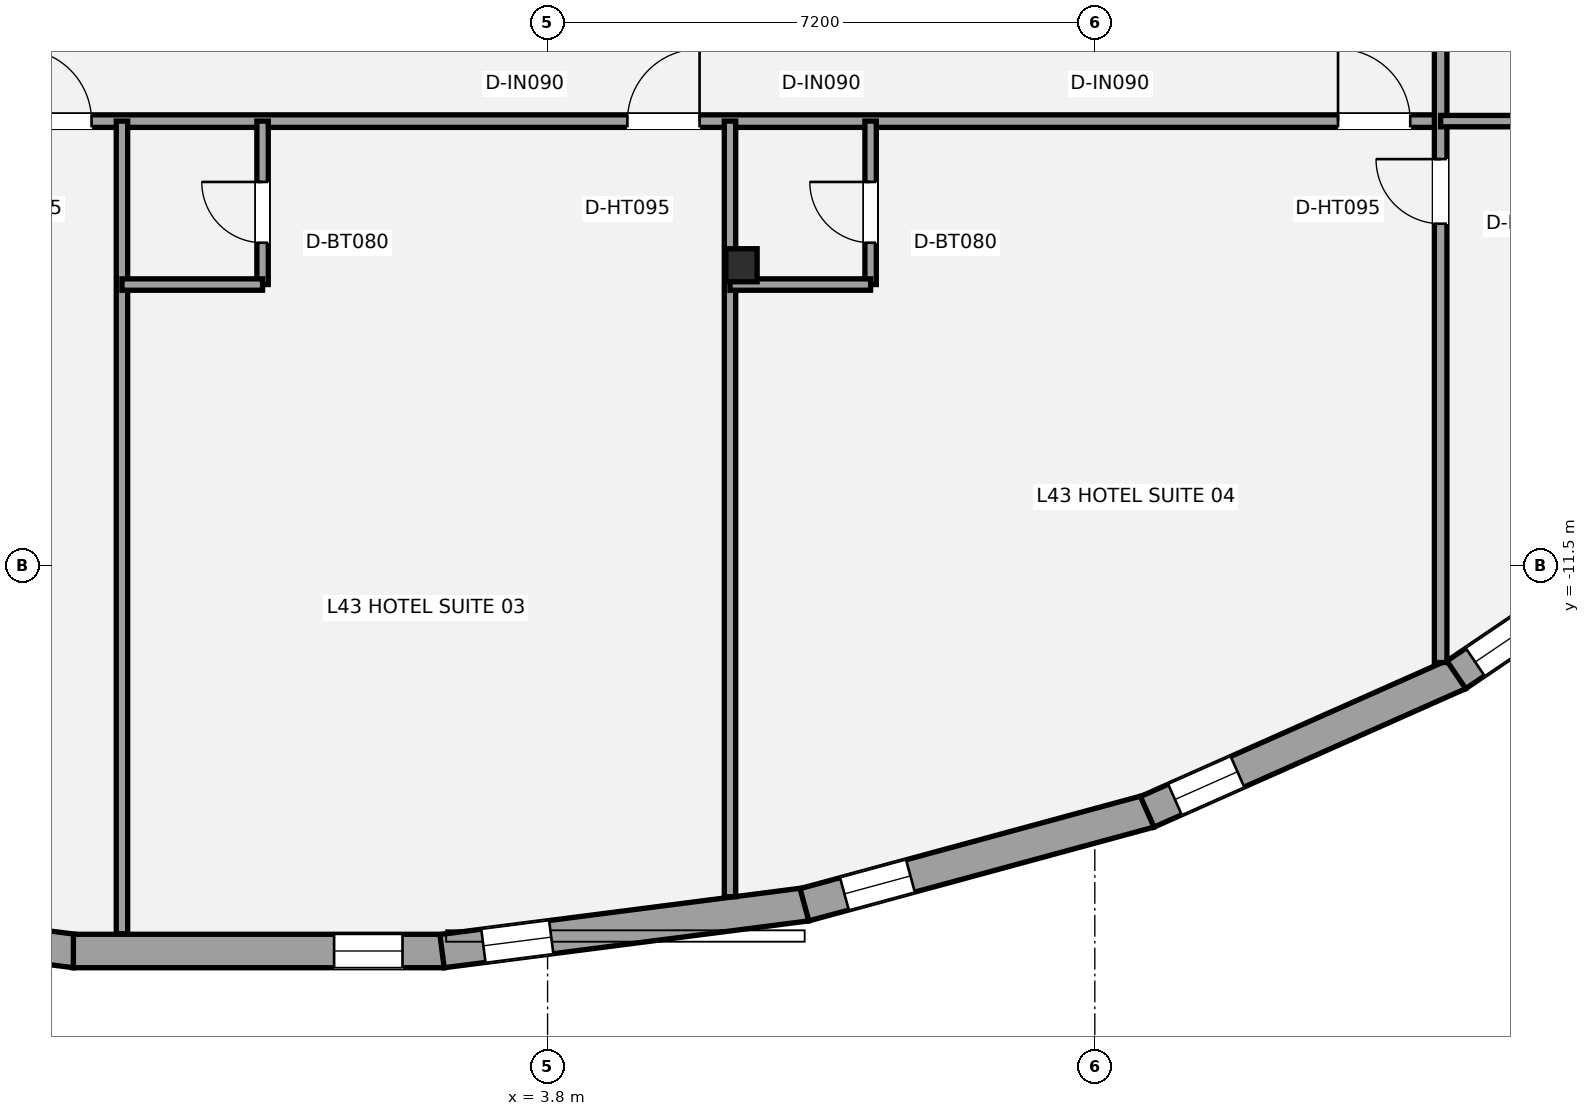
"""IFC4 building model, lengths in metres.
Left out: names, types, materials, properties, quantities, classifications, styles, units other than length and angle.
Written with IfcOpenShell. Run it as: python <this file> out.ifc"""

import sys

from ifc_helpers import new_model, si_unit, direction, frame, frame_2d, origin, origin_2d, place, context, subcontext, project, spatial, rectangle, i_section, extrude, element, fill, save


model = new_model("IFC4")
c1 = context("Model", 3, precision=1e-05, world=origin(), true_north=direction((0.0, 1.0)))
c2 = subcontext(c1, "Body", "Model", "MODEL_VIEW")
j1 = project(units=[si_unit("LENGTHUNIT", "METRE"), si_unit("PLANEANGLEUNIT", "RADIAN")], contexts=[c1])
p1 = place(None, origin())
s1 = spatial("IfcSite", under=j1, at=p1, CompositionType="ELEMENT")
p2 = place(p1, origin())
s2 = spatial("IfcBuilding", under=s1, at=p2, CompositionType="ELEMENT")
p3 = place(p2, frame((0.0, 0.0, 159.8)))
s3 = spatial("IfcBuildingStorey", under=s2, at=p3, CompositionType="ELEMENT", Elevation=159.8)
p4 = place(p3, frame((6.351, -7.546, 0.0), z_axis=(0.0, 0.0, 1.0), x_axis=(1.0, 0.0, 0.0)))
e1 = element("IfcColumn", 1, at=p4, inside=s3, PredefinedType="COLUMN", context=c2, shape_type="SweptSolid", body=[
    extrude(i_section(OverallWidth=0.412, OverallDepth=0.435, WebThickness=0.036, FlangeThickness=0.057, at=origin_2d()), origin(), (0.0, 0.0, 1.0), 3.2),
])
p5 = place(p3, frame((-2.411, -16.57, 0.0), z_axis=(0.0, 0.0, 1.0), x_axis=(-0.991852910824, 0.127388395426, 0.0)))
e2 = element("IfcWall", 2, at=p5, inside=s3, PredefinedType="STANDARD", context=c2, shape_type="SweptSolid", body=[
    extrude(rectangle(XDim=4.837, YDim=0.44, at=frame_2d((2.418, 0.0))), origin(), (0.0, 0.0, 1.0), 2.315),
])
p6 = place(p5, frame((0.598, 0.0, 0.58)))
e3 = element("IfcOpeningElement", 3, at=p6, cuts=e2, PredefinedType="OPENING", context=c2, shape_type="SweptSolid", body=[
    extrude(rectangle(XDim=0.9, YDim=1.35, at=frame_2d((0.45, 0.675))), frame((0.0, 0.23, 0.0), z_axis=(0.0, -1.0, 0.0), x_axis=(1.0, 0.0, 0.0)), (0.0, 0.0, 1.0), 0.46),
])
p7 = place(p3, frame((2.439, -16.568, 0.0), z_axis=(0.0, 0.0, 1.0), x_axis=(-1.0, 0.0, 0.0)))
e4 = element("IfcWall", 4, at=p7, inside=s3, PredefinedType="STANDARD", context=c2, shape_type="SweptSolid", body=[
    extrude(rectangle(XDim=4.878, YDim=0.44, at=frame_2d((2.439, 0.0))), origin(), (0.0, 0.0, 1.0), 2.315),
])
p8 = place(p7, frame((0.548, 0.0, 0.58)))
e5 = element("IfcOpeningElement", 5, at=p8, cuts=e4, PredefinedType="OPENING", context=c2, shape_type="SweptSolid", body=[
    extrude(rectangle(XDim=0.9, YDim=1.35, at=frame_2d((0.45, 0.675))), frame((0.0, 0.23, 0.0), z_axis=(0.0, -1.0, 0.0), x_axis=(1.0, 0.0, 0.0)), (0.0, 0.0, 1.0), 0.46),
])
p9 = place(p3, frame((7.209, -15.954, 0.0), z_axis=(0.0, 0.0, 1.0), x_axis=(-0.991852910824, -0.127388395426, 0.0)))
e6 = element("IfcWall", 6, at=p9, inside=s3, PredefinedType="STANDARD", context=c2, shape_type="SweptSolid", body=[
    extrude(rectangle(XDim=4.837, YDim=0.44, at=frame_2d((2.418, 0.0))), origin(), (0.0, 0.0, 1.0), 2.315),
])
p10 = place(p9, frame((3.388, 0.0, 0.58)))
e7 = element("IfcOpeningElement", 7, at=p10, cuts=e6, PredefinedType="OPENING", context=c2, shape_type="SweptSolid", body=[
    extrude(rectangle(XDim=0.9, YDim=1.35, at=frame_2d((0.45, 0.675))), frame((0.0, 0.23, 0.0), z_axis=(0.0, -1.0, 0.0), x_axis=(1.0, 0.0, 0.0)), (0.0, 0.0, 1.0), 0.46),
])
p11 = place(p3, frame((11.721, -14.726, 0.0), z_axis=(0.0, 0.0, 1.0), x_axis=(-0.965037424263, -0.262112132058, 0.0)))
e8 = element("IfcWall", 8, at=p11, inside=s3, PredefinedType="STANDARD", context=c2, shape_type="SweptSolid", body=[
    extrude(rectangle(XDim=4.707, YDim=0.44, at=frame_2d((2.353, 0.0))), origin(), (0.0, 0.0, 1.0), 2.315),
])
p12 = place(p11, frame((3.261, 0.0, 0.58)))
e9 = element("IfcOpeningElement", 9, at=p12, cuts=e8, PredefinedType="OPENING", context=c2, shape_type="SweptSolid", body=[
    extrude(rectangle(XDim=0.9, YDim=1.35, at=frame_2d((0.45, 0.675))), frame((0.0, 0.23, 0.0), z_axis=(0.0, -1.0, 0.0), x_axis=(1.0, 0.0, 0.0)), (0.0, 0.0, 1.0), 0.46),
])
p13 = place(p3, frame((15.791, -12.916, 0.0), z_axis=(0.0, 0.0, 1.0), x_axis=(-0.913907994914, -0.405921392431, 0.0)))
e10 = element("IfcWall", 10, at=p13, inside=s3, PredefinedType="STANDARD", context=c2, shape_type="SweptSolid", body=[
    extrude(rectangle(XDim=4.487, YDim=0.44, at=frame_2d((2.244, 0.0))), origin(), (0.0, 0.0, 1.0), 2.315),
])
p14 = place(p13, frame((3.188, 0.0, 0.58)))
e11 = element("IfcOpeningElement", 11, at=p14, cuts=e10, PredefinedType="OPENING", context=c2, shape_type="SweptSolid", body=[
    extrude(rectangle(XDim=0.9, YDim=1.35, at=frame_2d((0.45, 0.675))), frame((0.0, 0.23, 0.0), z_axis=(0.0, -1.0, 0.0), x_axis=(1.0, 0.0, 0.0)), (0.0, 0.0, 1.0), 0.46),
])
p15 = place(p3, frame((19.227, -10.583, 0.0), z_axis=(0.0, 0.0, 1.0), x_axis=(-0.827760762475, -0.561081206338, 0.0)))
e12 = element("IfcWall", 12, at=p15, inside=s3, PredefinedType="STANDARD", context=c2, shape_type="SweptSolid", body=[
    extrude(rectangle(XDim=4.192, YDim=0.44, at=frame_2d((2.096, 0.0))), origin(), (0.0, 0.0, 1.0), 2.315),
])
p16 = place(p15, frame((2.992, 0.0, 0.58)))
e13 = element("IfcOpeningElement", 13, at=p16, cuts=e12, PredefinedType="OPENING", context=c2, shape_type="SweptSolid", body=[
    extrude(rectangle(XDim=0.9, YDim=1.35, at=frame_2d((0.45, 0.675))), frame((0.0, 0.23, 0.0), z_axis=(0.0, -1.0, 0.0), x_axis=(1.0, 0.0, 0.0)), (0.0, 0.0, 1.0), 0.46),
])
p17 = place(p3, frame((-15.95, -5.65, 0.0), z_axis=(0.0, 0.0, 1.0), x_axis=(1.0, 0.0, 0.0)))
e14 = element("IfcWall", 14, at=p17, inside=s3, PredefinedType="PARTITIONING", context=c2, shape_type="SweptSolid", body=[
    extrude(rectangle(XDim=31.5, YDim=0.165, at=frame_2d((15.75, 0.0))), origin(), (0.0, 0.0, 1.0), 2.398),
])
p18 = place(p17, frame((4.8, 0.0, 0.0)))
e15 = element("IfcOpeningElement", 15, at=p18, cuts=e14, PredefinedType="OPENING", context=c2, shape_type="SweptSolid", body=[
    extrude(rectangle(XDim=0.95, YDim=2.15, at=frame_2d((0.475, 1.075))), frame((0.0, 0.093, 0.0), z_axis=(0.0, -1.0, 0.0), x_axis=(1.0, 0.0, 0.0)), (0.0, 0.0, 1.0), 0.185),
])
p19 = place(p17, frame((12.8, 0.0, 0.0)))
e16 = element("IfcOpeningElement", 16, at=p19, cuts=e14, PredefinedType="OPENING", context=c2, shape_type="SweptSolid", body=[
    extrude(rectangle(XDim=0.95, YDim=2.15, at=frame_2d((0.475, 1.075))), frame((0.0, 0.093, 0.0), z_axis=(0.0, -1.0, 0.0), x_axis=(1.0, 0.0, 0.0)), (0.0, 0.0, 1.0), 0.185),
])
p20 = place(p17, frame((20.8, 0.0, 0.0)))
e17 = element("IfcOpeningElement", 17, at=p20, cuts=e14, PredefinedType="OPENING", context=c2, shape_type="SweptSolid", body=[
    extrude(rectangle(XDim=0.95, YDim=2.15, at=frame_2d((0.475, 1.075))), frame((0.0, 0.093, 0.0), z_axis=(0.0, -1.0, 0.0), x_axis=(1.0, 0.0, 0.0)), (0.0, 0.0, 1.0), 0.185),
])
p21 = place(p17, frame((30.15, 0.0, 0.0)))
e18 = element("IfcOpeningElement", 18, at=p21, cuts=e14, PredefinedType="OPENING", context=c2, shape_type="SweptSolid", body=[
    extrude(rectangle(XDim=0.95, YDim=2.15, at=frame_2d((0.475, 1.075))), frame((0.0, 0.093, 0.0), z_axis=(0.0, -1.0, 0.0), x_axis=(1.0, 0.0, 0.0)), (0.0, 0.0, 1.0), 0.185),
])
p22 = place(p3, frame((15.55, -12.773, 0.0), z_axis=(0.0, 0.0, 1.0), x_axis=(0.0, 1.0, 0.0)))
e19 = element("IfcWall", 19, at=p22, inside=s3, PredefinedType="PARTITIONING", context=c2, shape_type="SweptSolid", body=[
    extrude(rectangle(XDim=20.323, YDim=0.165, at=frame_2d((10.162, 0.0))), origin(), (0.0, 0.0, 1.0), 2.473),
])
p23 = place(p22, frame((5.773, 0.0, 0.0)))
e20 = element("IfcOpeningElement", 20, at=p23, cuts=e19, PredefinedType="OPENING", context=c2, shape_type="SweptSolid", body=[
    extrude(rectangle(XDim=0.85, YDim=2.1, at=frame_2d((0.425, 1.05))), frame((0.0, 0.093, 0.0), z_axis=(0.0, -1.0, 0.0), x_axis=(1.0, 0.0, 0.0)), (0.0, 0.0, 1.0), 0.185),
])
p24 = place(p22, frame((9.823, 0.0, 0.0)))
e21 = element("IfcOpeningElement", 21, at=p24, cuts=e19, PredefinedType="OPENING", context=c2, shape_type="SweptSolid", body=[
    extrude(rectangle(XDim=0.95, YDim=2.15, at=frame_2d((0.475, 1.075))), frame((0.0, 0.093, 0.0), z_axis=(0.0, -1.0, 0.0), x_axis=(1.0, 0.0, 0.0)), (0.0, 0.0, 1.0), 0.185),
])
p25 = place(p22, frame((14.223, 0.0, 0.0)))
e22 = element("IfcOpeningElement", 22, at=p25, cuts=e19, PredefinedType="OPENING", context=c2, shape_type="SweptSolid", body=[
    extrude(rectangle(XDim=0.95, YDim=2.15, at=frame_2d((0.475, 1.075))), frame((0.0, 0.093, 0.0), z_axis=(0.0, -1.0, 0.0), x_axis=(1.0, 0.0, 0.0)), (0.0, 0.0, 1.0), 0.185),
])
p26 = place(p22, frame((18.973, 0.0, 0.0)))
e23 = element("IfcOpeningElement", 23, at=p26, cuts=e19, PredefinedType="OPENING", context=c2, shape_type="SweptSolid", body=[
    extrude(rectangle(XDim=0.95, YDim=2.15, at=frame_2d((0.475, 1.075))), frame((0.0, 0.093, 0.0), z_axis=(0.0, -1.0, 0.0), x_axis=(1.0, 0.0, 0.0)), (0.0, 0.0, 1.0), 0.185),
])
p27 = place(p3, frame((15.55, -5.65, 0.0), z_axis=(0.0, 0.0, 1.0), x_axis=(1.0, 0.0, 0.0)))
e24 = element("IfcWall", 24, at=p27, inside=s3, PredefinedType="PLUMBINGWALL", context=c2, shape_type="SweptSolid", body=[
    extrude(rectangle(XDim=7.346, YDim=0.15, at=frame_2d((3.673, 0.0))), origin(), (0.0, 0.0, 1.0), 2.473),
])
p28 = place(p3, frame((-1.8, -16.34, 0.0), z_axis=(0.0, 0.0, 1.0), x_axis=(0.0, 1.0, 0.0)))
e25 = element("IfcWall", 25, at=p28, inside=s3, PredefinedType="PLUMBINGWALL", context=c2, shape_type="SweptSolid", body=[
    extrude(rectangle(XDim=10.69, YDim=0.15, at=frame_2d((5.345, 0.0))), origin(), (0.0, 0.0, 1.0), 2.473),
])
p29 = place(p3, frame((6.2, -15.853, 0.0), z_axis=(0.0, 0.0, 1.0), x_axis=(0.0, 1.0, 0.0)))
e26 = element("IfcWall", 26, at=p29, inside=s3, PredefinedType="PLUMBINGWALL", context=c2, shape_type="SweptSolid", body=[
    extrude(rectangle(XDim=10.203, YDim=0.15, at=frame_2d((5.102, 0.0))), origin(), (0.0, 0.0, 1.0), 2.473),
])
p30 = place(p3, frame((0.05, -7.8, 0.0), z_axis=(0.0, 0.0, 1.0), x_axis=(0.0, 1.0, 0.0)))
e27 = element("IfcWall", 27, at=p30, inside=s3, PredefinedType="PLUMBINGWALL", context=c2, shape_type="SweptSolid", body=[
    extrude(rectangle(XDim=2.15, YDim=0.15, at=frame_2d((1.075, 0.0))), origin(), (0.0, 0.0, 1.0), 2.473),
])
p31 = place(p30, frame((0.55, 0.0, 0.0)))
e28 = element("IfcOpeningElement", 28, at=p31, cuts=e27, PredefinedType="OPENING", context=c2, shape_type="SweptSolid", body=[
    extrude(rectangle(XDim=0.8, YDim=2.1, at=frame_2d((0.4, 1.05))), frame((0.0, 0.085, 0.0), z_axis=(0.0, -1.0, 0.0), x_axis=(1.0, 0.0, 0.0)), (0.0, 0.0, 1.0), 0.17),
])
p32 = place(p3, frame((-1.8, -7.8, 0.0), z_axis=(0.0, 0.0, 1.0), x_axis=(1.0, 0.0, 0.0)))
e29 = element("IfcWall", 29, at=p32, inside=s3, PredefinedType="PLUMBINGWALL", context=c2, shape_type="SweptSolid", body=[
    extrude(rectangle(XDim=1.85, YDim=0.15, at=frame_2d((0.925, 0.0))), origin(), (0.0, 0.0, 1.0), 3.02),
])
p33 = place(p3, frame((8.05, -7.8, 0.0), z_axis=(0.0, 0.0, 1.0), x_axis=(0.0, 1.0, 0.0)))
e30 = element("IfcWall", 30, at=p33, inside=s3, PredefinedType="PLUMBINGWALL", context=c2, shape_type="SweptSolid", body=[
    extrude(rectangle(XDim=2.15, YDim=0.15, at=frame_2d((1.075, 0.0))), origin(), (0.0, 0.0, 1.0), 2.473),
])
p34 = place(p33, frame((0.55, 0.0, 0.0)))
e31 = element("IfcOpeningElement", 31, at=p34, cuts=e30, PredefinedType="OPENING", context=c2, shape_type="SweptSolid", body=[
    extrude(rectangle(XDim=0.8, YDim=2.1, at=frame_2d((0.4, 1.05))), frame((0.0, 0.085, 0.0), z_axis=(0.0, -1.0, 0.0), x_axis=(1.0, 0.0, 0.0)), (0.0, 0.0, 1.0), 0.17),
])
p35 = place(p3, frame((6.2, -7.8, 0.0), z_axis=(0.0, 0.0, 1.0), x_axis=(1.0, 0.0, 0.0)))
e32 = element("IfcWall", 32, at=p35, inside=s3, PredefinedType="PLUMBINGWALL", context=c2, shape_type="SweptSolid", body=[
    extrude(rectangle(XDim=1.85, YDim=0.15, at=frame_2d((0.925, 0.0))), origin(), (0.0, 0.0, 1.0), 2.473),
])
p36 = place(p8, origin())
e33 = element("IfcWindow", 33, at=p36, inside=s3, PartitioningType="SINGLE_PANEL", PredefinedType="WINDOW", context=c2, shape_type="SweptSolid", body=[
    extrude(rectangle(XDim=0.9, YDim=1.35, at=frame_2d((0.45, 0.675))), frame((0.0, -0.01, 0.0), z_axis=(0.0, -1.0, 0.0), x_axis=(1.0, 0.0, 0.0)), (0.0, 0.0, 1.0), 0.06),
])
fill(e5, e33)
p37 = place(p10, origin())
e34 = element("IfcWindow", 34, at=p37, inside=s3, PartitioningType="SINGLE_PANEL", PredefinedType="WINDOW", context=c2, shape_type="SweptSolid", body=[
    extrude(rectangle(XDim=0.9, YDim=1.35, at=frame_2d((0.45, 0.675))), frame((0.0, -0.01, 0.0), z_axis=(0.0, -1.0, 0.0), x_axis=(1.0, 0.0, 0.0)), (0.0, 0.0, 1.0), 0.06),
])
fill(e7, e34)
p38 = place(p12, origin())
e35 = element("IfcWindow", 35, at=p38, inside=s3, PartitioningType="SINGLE_PANEL", PredefinedType="WINDOW", context=c2, shape_type="SweptSolid", body=[
    extrude(rectangle(XDim=0.9, YDim=1.35, at=frame_2d((0.45, 0.675))), frame((0.0, -0.01, 0.0), z_axis=(0.0, -1.0, 0.0), x_axis=(1.0, 0.0, 0.0)), (0.0, 0.0, 1.0), 0.06),
])
fill(e9, e35)
p39 = place(p14, origin())
e36 = element("IfcWindow", 36, at=p39, inside=s3, PartitioningType="SINGLE_PANEL", PredefinedType="WINDOW", context=c2, shape_type="SweptSolid", body=[
    extrude(rectangle(XDim=0.9, YDim=1.35, at=frame_2d((0.45, 0.675))), frame((0.0, -0.01, 0.0), z_axis=(0.0, -1.0, 0.0), x_axis=(1.0, 0.0, 0.0)), (0.0, 0.0, 1.0), 0.06),
])
fill(e11, e36)
p40 = place(p16, origin())
e37 = element("IfcWindow", 37, at=p40, inside=s3, PartitioningType="SINGLE_PANEL", PredefinedType="WINDOW", context=c2, shape_type="SweptSolid", body=[
    extrude(rectangle(XDim=0.9, YDim=1.35, at=frame_2d((0.45, 0.675))), frame((0.0, -0.01, 0.0), z_axis=(0.0, -1.0, 0.0), x_axis=(1.0, 0.0, 0.0)), (0.0, 0.0, 1.0), 0.06),
])
fill(e13, e37)
p41 = place(p23, origin())
e38 = element("IfcDoor", 38, at=p41, inside=s3, OperationType="SINGLE_SWING_RIGHT", PredefinedType="DOOR", context=c2, shape_type="SweptSolid", body=[
    extrude(rectangle(XDim=0.85, YDim=2.1, at=frame_2d((0.425, 1.05))), frame((0.0, 0.025, 0.0), z_axis=(0.0, -1.0, 0.0), x_axis=(1.0, 0.0, 0.0)), (0.0, 0.0, 1.0), 0.05),
])
fill(e20, e38)
p42 = place(p19, origin())
e39 = element("IfcDoor", 39, at=p42, inside=s3, OperationType="SINGLE_SWING_LEFT", PredefinedType="DOOR", context=c2, shape_type="SweptSolid", body=[
    extrude(rectangle(XDim=0.95, YDim=2.15, at=frame_2d((0.475, 1.075))), frame((0.0, 0.025, 0.0), z_axis=(0.0, -1.0, 0.0), x_axis=(1.0, 0.0, 0.0)), (0.0, 0.0, 1.0), 0.05),
])
fill(e16, e39)
p43 = place(p20, origin())
e40 = element("IfcDoor", 40, at=p43, inside=s3, OperationType="SINGLE_SWING_RIGHT", PredefinedType="DOOR", context=c2, shape_type="SweptSolid", body=[
    extrude(rectangle(XDim=0.95, YDim=2.15, at=frame_2d((0.475, 1.075))), frame((0.0, 0.025, 0.0), z_axis=(0.0, -1.0, 0.0), x_axis=(1.0, 0.0, 0.0)), (0.0, 0.0, 1.0), 0.05),
])
fill(e17, e40)
p44 = place(p31, origin())
e41 = element("IfcDoor", 41, at=p44, inside=s3, OperationType="SINGLE_SWING_RIGHT", PredefinedType="DOOR", context=c2, shape_type="SweptSolid", body=[
    extrude(rectangle(XDim=0.8, YDim=2.1, at=frame_2d((0.4, 1.05))), frame((0.0, 0.025, 0.0), z_axis=(0.0, -1.0, 0.0), x_axis=(1.0, 0.0, 0.0)), (0.0, 0.0, 1.0), 0.05),
])
fill(e28, e41)
p45 = place(p21, origin())
e42 = element("IfcDoor", 42, at=p45, inside=s3, OperationType="SINGLE_SWING_LEFT", PredefinedType="DOOR", context=c2, shape_type="SweptSolid", body=[
    extrude(rectangle(XDim=0.95, YDim=2.15, at=frame_2d((0.475, 1.075))), frame((0.0, 0.025, 0.0), z_axis=(0.0, -1.0, 0.0), x_axis=(1.0, 0.0, 0.0)), (0.0, 0.0, 1.0), 0.05),
])
fill(e18, e42)
p46 = place(p34, origin())
e43 = element("IfcDoor", 43, at=p46, inside=s3, OperationType="SINGLE_SWING_RIGHT", PredefinedType="DOOR", context=c2, shape_type="SweptSolid", body=[
    extrude(rectangle(XDim=0.8, YDim=2.1, at=frame_2d((0.4, 1.05))), frame((0.0, 0.025, 0.0), z_axis=(0.0, -1.0, 0.0), x_axis=(1.0, 0.0, 0.0)), (0.0, 0.0, 1.0), 0.05),
])
fill(e31, e43)
save(model, sys.argv[1])
